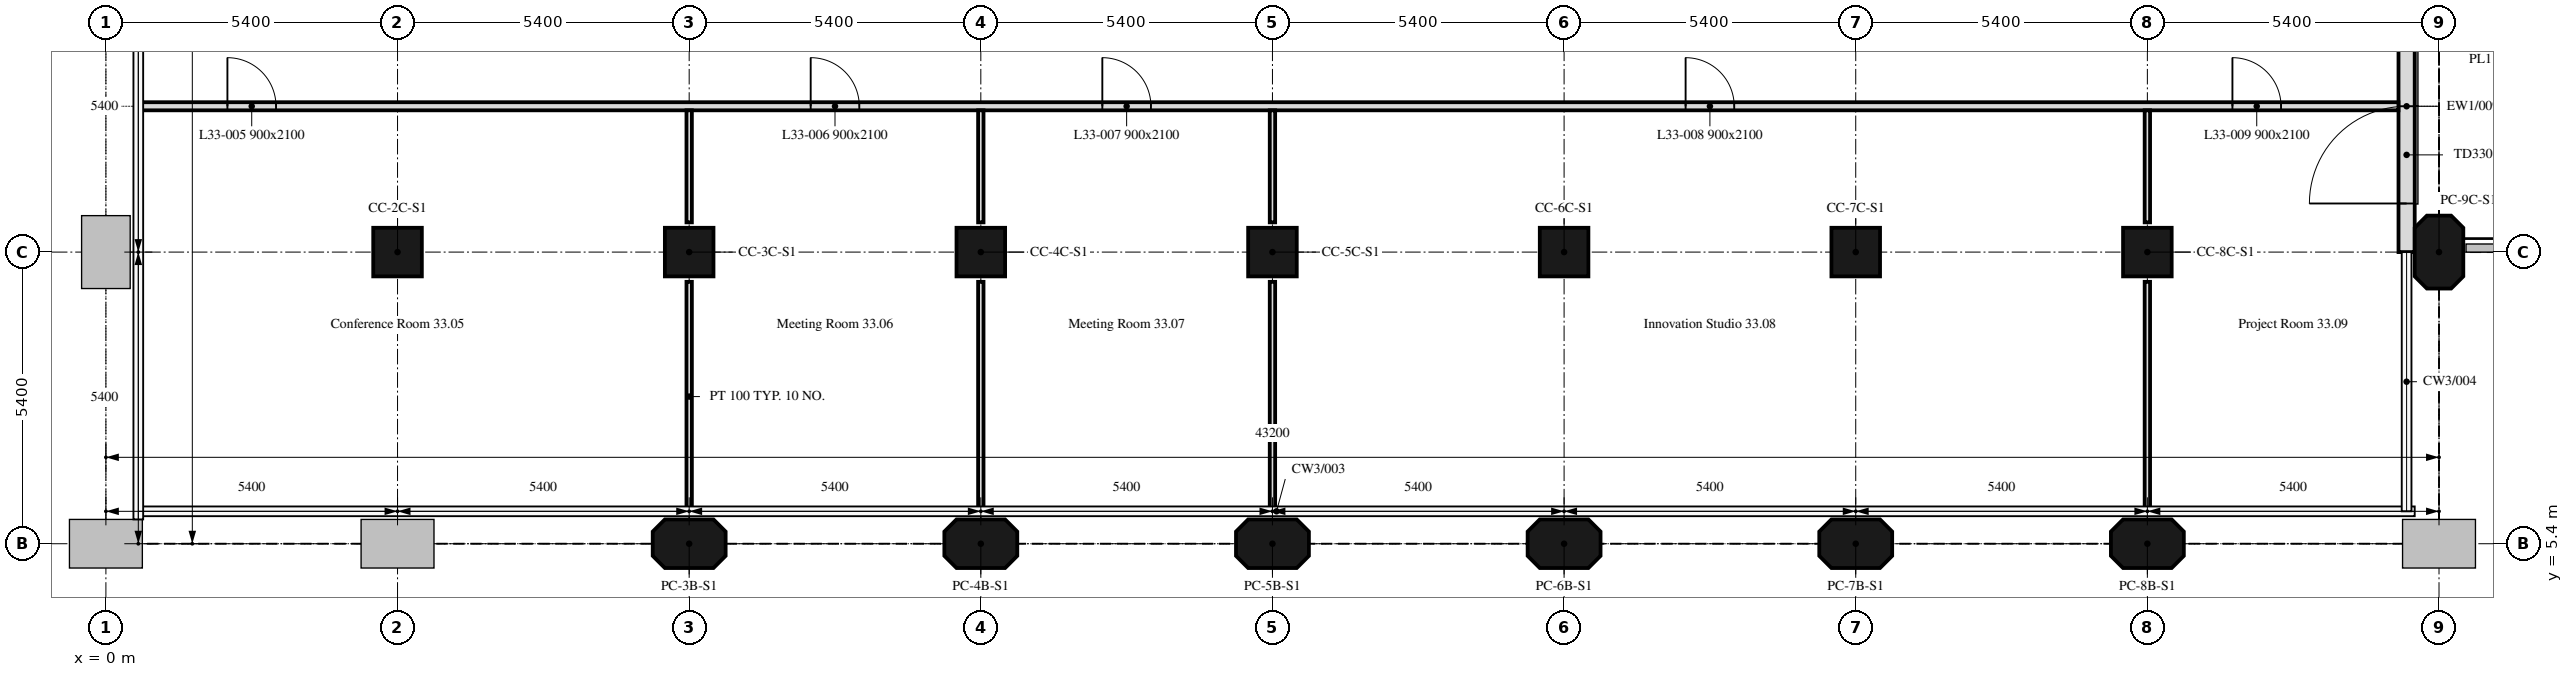
"""IFC4 building model, lengths in metres.
Left out: names, types, materials, properties, quantities, classifications, styles, units other than length and angle.
Written with IfcOpenShell. Run it as: python <this file> out.ifc"""

import sys

from ifc_helpers import new_model, si_unit, direction, frame, frame_2d, origin, origin_2d, place, context, subcontext, project, spatial, polyline, rectangle, outline, extrude, element, fill, save


model = new_model("IFC4")
c1 = context("Model", 3, precision=1e-05, world=origin(), true_north=direction((0.0, 1.0)))
c2 = subcontext(c1, "Body", "Model", "MODEL_VIEW")
j1 = project(units=[si_unit("LENGTHUNIT", "METRE"), si_unit("PLANEANGLEUNIT", "RADIAN")], contexts=[c1])
p1 = place(None, origin())
s1 = spatial("IfcSite", under=j1, at=p1, CompositionType="ELEMENT")
p2 = place(p1, origin())
s2 = spatial("IfcBuilding", under=s1, at=p2, CompositionType="ELEMENT")
p3 = place(p2, frame((0.0, 0.0, 143.2)))
s3 = spatial("IfcBuildingStorey", under=s2, at=p3, CompositionType="ELEMENT", Elevation=143.2)
for number, where, z_axis, x_axis in (
    (1, (10.8, 5.4, 0.0), (0.0, 0.0, 1.0), (1.0, 0.0, 0.0)),
    (2, (16.2, 5.4, 0.0), (0.0, 0.0, 1.0), (1.0, 0.0, 0.0)),
    (3, (21.6, 5.4, 0.0), (0.0, 0.0, 1.0), (1.0, 0.0, 0.0)),
    (4, (27.0, 5.4, 0.0), (0.0, 0.0, 1.0), (1.0, 0.0, 0.0)),
    (5, (32.4, 5.4, 0.0), (0.0, 0.0, 1.0), (1.0, 0.0, 0.0)),
    (6, (37.8, 5.4, 0.0), (0.0, 0.0, 1.0), (1.0, 0.0, 0.0)),
):
    element("IfcColumn", number, at=place(p3, frame(where, z_axis=z_axis, x_axis=x_axis)), inside=s3, PredefinedType="COLUMN", context=c2, shape_type="SweptSolid", body=[
        extrude(outline(polyline([(-0.45, -0.45), (0.45, -0.45), (0.675, -0.225), (0.675, 0.225), (0.45, 0.45), (-0.45, 0.45), (-0.675, 0.225), (-0.675, -0.225), (-0.45, -0.45)])), origin(), (0.0, 0.0, 1.0), 4.5),
    ])
for number, where, z_axis, x_axis in (
    (7, (5.4, 10.8, 0.0), (0.0, 0.0, 1.0), (1.0, 0.0, 0.0)),
    (8, (10.8, 10.8, 0.0), (0.0, 0.0, 1.0), (1.0, 0.0, 0.0)),
    (9, (16.2, 10.8, 0.0), (0.0, 0.0, 1.0), (1.0, 0.0, 0.0)),
    (10, (21.6, 10.8, 0.0), (0.0, 0.0, 1.0), (1.0, 0.0, 0.0)),
    (11, (27.0, 10.8, 0.0), (0.0, 0.0, 1.0), (1.0, 0.0, 0.0)),
    (12, (32.4, 10.8, 0.0), (0.0, 0.0, 1.0), (1.0, 0.0, 0.0)),
    (13, (37.8, 10.8, 0.0), (0.0, 0.0, 1.0), (1.0, 0.0, 0.0)),
):
    element("IfcColumn", number, at=place(p3, frame(where, z_axis=z_axis, x_axis=x_axis)), inside=s3, PredefinedType="COLUMN", context=c2, shape_type="SweptSolid", body=[
        extrude(rectangle(XDim=0.9, YDim=0.9, at=origin_2d()), origin(), (0.0, 0.0, 1.0), 4.5),
    ])
p4 = place(p3, frame((43.2, 10.8, 0.0), z_axis=(0.0, 0.0, 1.0), x_axis=(0.0, 1.0, 0.0)))
e14 = element("IfcColumn", 14, at=p4, inside=s3, PredefinedType="COLUMN", context=c2, shape_type="SweptSolid", body=[
    extrude(outline(polyline([(-0.45, -0.45), (0.45, -0.45), (0.675, -0.225), (0.675, 0.225), (0.45, 0.45), (-0.45, 0.45), (-0.675, 0.225), (-0.675, -0.225), (-0.45, -0.45)])), origin(), (0.0, 0.0, 1.0), 4.5),
])
p5 = place(p3, frame((42.6, 10.8, 0.0), z_axis=(0.0, 0.0, 1.0), x_axis=(0.0, 1.0, 0.0)))
e15 = element("IfcWall", 15, at=p5, inside=s3, PredefinedType="SOLIDWALL", context=c2, shape_type="SweptSolid", body=[
    extrude(rectangle(XDim=5.4, YDim=0.3, at=frame_2d((2.7, 0.0))), origin(), (0.0, 0.0, 1.0), 4.5),
])
p6 = place(p5, frame((0.9, 0.0, 0.0)))
e16 = element("IfcOpeningElement", 16, at=p6, cuts=e15, PredefinedType="OPENING", context=c2, shape_type="SweptSolid", body=[
    extrude(rectangle(XDim=1.8, YDim=2.4, at=frame_2d((0.9, 1.2))), frame((0.0, 0.16, 0.0), z_axis=(0.0, -1.0, 0.0), x_axis=(1.0, 0.0, 0.0)), (0.0, 0.0, 1.0), 0.32),
])
p7 = place(p3, frame((0.6, 13.5, 0.0), z_axis=(0.0, 0.0, 1.0), x_axis=(1.0, 0.0, 0.0)))
e17 = element("IfcWall", 17, at=p7, inside=s3, PredefinedType="PARTITIONING", context=c2, shape_type="SweptSolid", body=[
    extrude(rectangle(XDim=41.849, YDim=0.15, at=frame_2d((20.924, 0.0))), origin(), (0.0, 0.0, 1.0), 4.5),
])
p8 = place(p7, frame((1.65, 0.0, 0.0)))
e18 = element("IfcOpeningElement", 18, at=p8, cuts=e17, PredefinedType="OPENING", context=c2, shape_type="SweptSolid", body=[
    extrude(rectangle(XDim=0.9, YDim=2.1, at=frame_2d((0.45, 1.05))), frame((0.0, 0.075, 0.0), z_axis=(0.0, -1.0, 0.0), x_axis=(1.0, 0.0, 0.0)), (0.0, 0.0, 1.0), 0.15),
])
p9 = place(p7, frame((12.45, 0.0, 0.0)))
e19 = element("IfcOpeningElement", 19, at=p9, cuts=e17, PredefinedType="OPENING", context=c2, shape_type="SweptSolid", body=[
    extrude(rectangle(XDim=0.9, YDim=2.1, at=frame_2d((0.45, 1.05))), frame((0.0, 0.075, 0.0), z_axis=(0.0, -1.0, 0.0), x_axis=(1.0, 0.0, 0.0)), (0.0, 0.0, 1.0), 0.15),
])
p10 = place(p7, frame((17.85, 0.0, 0.0)))
e20 = element("IfcOpeningElement", 20, at=p10, cuts=e17, PredefinedType="OPENING", context=c2, shape_type="SweptSolid", body=[
    extrude(rectangle(XDim=0.9, YDim=2.1, at=frame_2d((0.45, 1.05))), frame((0.0, 0.075, 0.0), z_axis=(0.0, -1.0, 0.0), x_axis=(1.0, 0.0, 0.0)), (0.0, 0.0, 1.0), 0.15),
])
p11 = place(p7, frame((28.65, 0.0, 0.0)))
e21 = element("IfcOpeningElement", 21, at=p11, cuts=e17, PredefinedType="OPENING", context=c2, shape_type="SweptSolid", body=[
    extrude(rectangle(XDim=0.9, YDim=2.1, at=frame_2d((0.45, 1.05))), frame((0.0, 0.075, 0.0), z_axis=(0.0, -1.0, 0.0), x_axis=(1.0, 0.0, 0.0)), (0.0, 0.0, 1.0), 0.15),
])
p12 = place(p7, frame((38.775, 0.0, 0.0)))
e22 = element("IfcOpeningElement", 22, at=p12, cuts=e17, PredefinedType="OPENING", context=c2, shape_type="SweptSolid", body=[
    extrude(rectangle(XDim=0.9, YDim=2.1, at=frame_2d((0.45, 1.05))), frame((0.0, 0.075, 0.0), z_axis=(0.0, -1.0, 0.0), x_axis=(1.0, 0.0, 0.0)), (0.0, 0.0, 1.0), 0.15),
])
p13 = place(p3, frame((10.8, 6.0, 0.0), z_axis=(0.0, 0.0, 1.0), x_axis=(0.0, 1.0, 0.0)))
e23 = element("IfcWall", 23, at=p13, inside=s3, PredefinedType="PARTITIONING", context=c2, shape_type="SweptSolid", body=[
    extrude(rectangle(XDim=4.249, YDim=0.1, at=frame_2d((2.125, 0.0))), origin(), (0.0, 0.0, 1.0), 4.5),
])
p14 = place(p3, frame((10.8, 11.351, 0.0), z_axis=(0.0, 0.0, 1.0), x_axis=(0.0, 1.0, 0.0)))
e24 = element("IfcWall", 24, at=p14, inside=s3, PredefinedType="PARTITIONING", context=c2, shape_type="SweptSolid", body=[
    extrude(rectangle(XDim=2.074, YDim=0.1, at=frame_2d((1.037, 0.0))), origin(), (0.0, 0.0, 1.0), 4.5),
])
p15 = place(p3, frame((16.2, 6.0, 0.0), z_axis=(0.0, 0.0, 1.0), x_axis=(0.0, 1.0, 0.0)))
e25 = element("IfcWall", 25, at=p15, inside=s3, PredefinedType="PARTITIONING", context=c2, shape_type="SweptSolid", body=[
    extrude(rectangle(XDim=4.249, YDim=0.1, at=frame_2d((2.125, 0.0))), origin(), (0.0, 0.0, 1.0), 4.5),
])
p16 = place(p3, frame((16.2, 11.351, 0.0), z_axis=(0.0, 0.0, 1.0), x_axis=(0.0, 1.0, 0.0)))
e26 = element("IfcWall", 26, at=p16, inside=s3, PredefinedType="PARTITIONING", context=c2, shape_type="SweptSolid", body=[
    extrude(rectangle(XDim=2.074, YDim=0.1, at=frame_2d((1.037, 0.0))), origin(), (0.0, 0.0, 1.0), 4.5),
])
p17 = place(p3, frame((21.6, 6.0, 0.0), z_axis=(0.0, 0.0, 1.0), x_axis=(0.0, 1.0, 0.0)))
e27 = element("IfcWall", 27, at=p17, inside=s3, PredefinedType="PARTITIONING", context=c2, shape_type="SweptSolid", body=[
    extrude(rectangle(XDim=4.249, YDim=0.1, at=frame_2d((2.125, 0.0))), origin(), (0.0, 0.0, 1.0), 4.5),
])
p18 = place(p3, frame((21.6, 11.351, 0.0), z_axis=(0.0, 0.0, 1.0), x_axis=(0.0, 1.0, 0.0)))
e28 = element("IfcWall", 28, at=p18, inside=s3, PredefinedType="PARTITIONING", context=c2, shape_type="SweptSolid", body=[
    extrude(rectangle(XDim=2.074, YDim=0.1, at=frame_2d((1.037, 0.0))), origin(), (0.0, 0.0, 1.0), 4.5),
])
p19 = place(p3, frame((37.8, 6.0, 0.0), z_axis=(0.0, 0.0, 1.0), x_axis=(0.0, 1.0, 0.0)))
e29 = element("IfcWall", 29, at=p19, inside=s3, PredefinedType="PARTITIONING", context=c2, shape_type="SweptSolid", body=[
    extrude(rectangle(XDim=4.249, YDim=0.1, at=frame_2d((2.125, 0.0))), origin(), (0.0, 0.0, 1.0), 4.5),
])
p20 = place(p3, frame((37.8, 11.351, 0.0), z_axis=(0.0, 0.0, 1.0), x_axis=(0.0, 1.0, 0.0)))
e30 = element("IfcWall", 30, at=p20, inside=s3, PredefinedType="PARTITIONING", context=c2, shape_type="SweptSolid", body=[
    extrude(rectangle(XDim=2.074, YDim=0.1, at=frame_2d((1.037, 0.0))), origin(), (0.0, 0.0, 1.0), 4.5),
])
p21 = place(p6, origin())
e31 = element("IfcDoor", 31, at=p21, inside=s3, OperationType="DOUBLE_DOOR_DOUBLE_SWING", PredefinedType="DOOR", context=c2, shape_type="SweptSolid", body=[
    extrude(rectangle(XDim=1.8, YDim=2.4, at=frame_2d((0.9, 1.2))), frame((0.0, 0.025, 0.0), z_axis=(0.0, -1.0, 0.0), x_axis=(1.0, 0.0, 0.0)), (0.0, 0.0, 1.0), 0.05),
])
fill(e16, e31)
p22 = place(p8, origin())
e32 = element("IfcDoor", 32, at=p22, inside=s3, OperationType="SINGLE_SWING_RIGHT", PredefinedType="DOOR", context=c2, shape_type="SweptSolid", body=[
    extrude(rectangle(XDim=0.9, YDim=2.1, at=frame_2d((0.45, 1.05))), frame((0.0, 0.025, 0.0), z_axis=(0.0, -1.0, 0.0), x_axis=(1.0, 0.0, 0.0)), (0.0, 0.0, 1.0), 0.05),
])
fill(e18, e32)
p23 = place(p9, origin())
e33 = element("IfcDoor", 33, at=p23, inside=s3, OperationType="SINGLE_SWING_RIGHT", PredefinedType="DOOR", context=c2, shape_type="SweptSolid", body=[
    extrude(rectangle(XDim=0.9, YDim=2.1, at=frame_2d((0.45, 1.05))), frame((0.0, 0.025, 0.0), z_axis=(0.0, -1.0, 0.0), x_axis=(1.0, 0.0, 0.0)), (0.0, 0.0, 1.0), 0.05),
])
fill(e19, e33)
p24 = place(p10, origin())
e34 = element("IfcDoor", 34, at=p24, inside=s3, OperationType="SINGLE_SWING_RIGHT", PredefinedType="DOOR", context=c2, shape_type="SweptSolid", body=[
    extrude(rectangle(XDim=0.9, YDim=2.1, at=frame_2d((0.45, 1.05))), frame((0.0, 0.025, 0.0), z_axis=(0.0, -1.0, 0.0), x_axis=(1.0, 0.0, 0.0)), (0.0, 0.0, 1.0), 0.05),
])
fill(e20, e34)
p25 = place(p11, origin())
e35 = element("IfcDoor", 35, at=p25, inside=s3, OperationType="SINGLE_SWING_LEFT", PredefinedType="DOOR", context=c2, shape_type="SweptSolid", body=[
    extrude(rectangle(XDim=0.9, YDim=2.1, at=frame_2d((0.45, 1.05))), frame((0.0, 0.025, 0.0), z_axis=(0.0, -1.0, 0.0), x_axis=(1.0, 0.0, 0.0)), (0.0, 0.0, 1.0), 0.05),
])
fill(e21, e35)
p26 = place(p12, origin())
e36 = element("IfcDoor", 36, at=p26, inside=s3, OperationType="SINGLE_SWING_LEFT", PredefinedType="DOOR", context=c2, shape_type="SweptSolid", body=[
    extrude(rectangle(XDim=0.9, YDim=2.1, at=frame_2d((0.45, 1.05))), frame((0.0, 0.025, 0.0), z_axis=(0.0, -1.0, 0.0), x_axis=(1.0, 0.0, 0.0)), (0.0, 0.0, 1.0), 0.05),
])
fill(e22, e36)
save(model, sys.argv[1])
